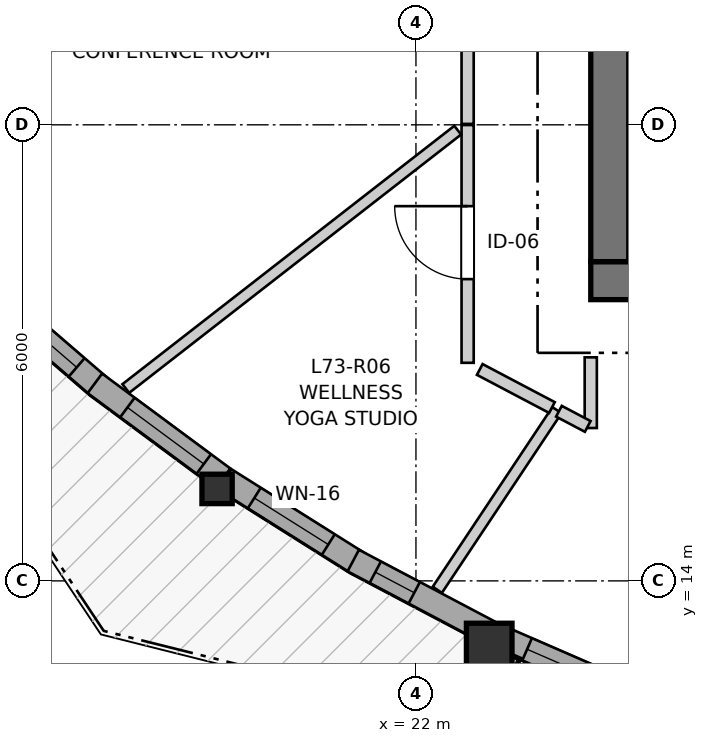
"""IFC4 building model, lengths in metres.
Left out: names, types, materials, properties, quantities, classifications, styles, units other than length and angle.
Written with IfcOpenShell. Run it as: python <this file> out.ifc"""

import sys

from ifc_helpers import new_model, si_unit, direction, frame, frame_2d, origin, origin_2d, place, context, subcontext, project, spatial, rectangle, i_section, extrude, source, transform, mapped, element, fill, save


model = new_model("IFC4")
c1 = context("Model", 3, precision=1e-05, world=origin(), true_north=direction((0.0, 1.0)))
c2 = subcontext(c1, "Body", "Model", "MODEL_VIEW")
j1 = project(units=[si_unit("LENGTHUNIT", "METRE"), si_unit("PLANEANGLEUNIT", "RADIAN")], contexts=[c1])
p1 = place(None, origin())
s1 = spatial("IfcSite", under=j1, at=p1, CompositionType="ELEMENT")
p2 = place(p1, origin())
s2 = spatial("IfcBuilding", under=s1, at=p2, CompositionType="ELEMENT")
p3 = place(p2, frame((0.0, 0.0, 243.6)))
s3 = spatial("IfcBuildingStorey", under=s2, at=p3, CompositionType="ELEMENT", Elevation=243.6)
p4 = place(p3, frame((24.3, 17.95, 0.0), z_axis=(0.0, 0.0, 1.0), x_axis=(1.0, 0.0, 0.0)))
e1 = element("IfcWall", 1, at=p4, inside=s3, PredefinedType="SHEAR", context=c2, shape_type="SweptSolid", body=[
    extrude(rectangle(XDim=12.1, YDim=0.5, at=frame_2d((6.05, 0.0))), origin(), (0.0, 0.0, 1.0), 2.96),
])
p5 = place(p3, frame((24.55, 33.8, 0.0), z_axis=(0.0, 0.0, 1.0), x_axis=(0.0, -1.0, 0.0)))
e2 = element("IfcWall", 2, at=p5, inside=s3, PredefinedType="SHEAR", context=c2, shape_type="SweptSolid", body=[
    extrude(rectangle(XDim=15.6, YDim=0.5, at=frame_2d((7.8, 0.0))), origin(), (0.0, 0.0, 1.0), 2.96),
])
p6 = place(p5, frame((7.05, 0.0, 0.0)))
e3 = element("IfcOpeningElement", 3, at=p6, cuts=e2, PredefinedType="OPENING", context=c2, shape_type="SweptSolid", body=[
    extrude(rectangle(XDim=1.5, YDim=2.15, at=frame_2d((0.75, 1.075))), frame((0.0, 0.26, 0.0), z_axis=(0.0, -1.0, 0.0), x_axis=(1.0, 0.0, 0.0)), (0.0, 0.0, 1.0), 0.52),
])
p7 = place(p5, frame((3.52, 0.0, 0.0)))
e4 = element("IfcOpeningElement", 4, at=p7, cuts=e2, PredefinedType="OPENING", context=c2, shape_type="SweptSolid", body=[
    extrude(rectangle(XDim=0.86, YDim=2.05, at=frame_2d((0.43, 1.025))), frame((0.0, 0.26, 0.0), z_axis=(0.0, -1.0, 0.0), x_axis=(1.0, 0.0, 0.0)), (0.0, 0.0, 1.0), 0.52),
])
p8 = place(p5, frame((11.22, 0.0, 0.0)))
e5 = element("IfcOpeningElement", 5, at=p8, cuts=e2, PredefinedType="OPENING", context=c2, shape_type="SweptSolid", body=[
    extrude(rectangle(XDim=0.86, YDim=2.05, at=frame_2d((0.43, 1.025))), frame((0.0, 0.26, 0.0), z_axis=(0.0, -1.0, 0.0), x_axis=(1.0, 0.0, 0.0)), (0.0, 0.0, 1.0), 0.52),
])
m1 = source(origin(), c2, "Body", "SweptSolid", [
    extrude(i_section(OverallWidth=0.398, OverallDepth=0.387, WebThickness=0.019, FlangeThickness=0.03, FilletRadius=0.015, at=origin_2d()), origin(), (0.0, 0.0, 1.0), 2.96),
])
p9 = place(p3, frame((19.383, 15.21, 0.0), z_axis=(0.0, 0.0, 1.0), x_axis=(1.0, 0.0, 0.0)))
e6 = element("IfcColumn", 6, at=p9, inside=s3, PredefinedType="PILASTER", context=c2, shape_type="MappedRepresentation", body=[
    mapped(m1, transform((0.0, 0.0, 0.0), x_axis=(1.0, 0.0, 0.0), y_axis=(0.0, 1.0, 0.0), z_axis=(0.0, 0.0, 1.0), scale=1.0)),
])
m2 = source(origin(), c2, "Body", "SweptSolid", [
    extrude(rectangle(XDim=0.6, YDim=0.6, at=origin_2d()), origin(), (0.0, 0.0, 1.0), 2.96),
])
p10 = place(p3, frame((22.964, 13.143, 0.0), z_axis=(0.0, 0.0, 1.0), x_axis=(1.0, 0.0, 0.0)))
e7 = element("IfcColumn", 7, at=p10, inside=s3, PredefinedType="COLUMN", context=c2, shape_type="MappedRepresentation", body=[
    mapped(m2, transform((0.0, 0.0, 0.0), x_axis=(1.0, 0.0, 0.0), y_axis=(0.0, 1.0, 0.0), z_axis=(0.0, 0.0, 1.0), scale=1.0)),
])
p11 = place(p3, frame((16.29, 17.884, 0.0), z_axis=(0.0, 0.0, 1.0), x_axis=(0.757405903716, -0.652944329186, 0.0)))
e8 = element("IfcWall", 8, at=p11, inside=s3, PredefinedType="SOLIDWALL", context=c2, shape_type="SweptSolid", body=[
    extrude(rectangle(XDim=2.052, YDim=0.32, at=frame_2d((1.026, 0.0))), origin(), (0.0, 0.0, 1.0), 2.58),
])
p12 = place(p11, frame((0.396, 0.0, 0.82)))
e9 = element("IfcOpeningElement", 9, at=p12, cuts=e8, PredefinedType="OPENING", context=c2, shape_type="SweptSolid", body=[
    extrude(rectangle(XDim=1.25, YDim=1.35, at=frame_2d((0.625, 0.675))), frame((0.0, 0.17, 0.0), z_axis=(0.0, -1.0, 0.0), x_axis=(1.0, 0.0, 0.0)), (0.0, 0.0, 1.0), 0.34),
])
p13 = place(p3, frame((17.775, 16.599, 0.0), z_axis=(0.0, 0.0, 1.0), x_axis=(0.803808524664, -0.594888103493, 0.0)))
e10 = element("IfcWall", 10, at=p13, inside=s3, PredefinedType="SOLIDWALL", context=c2, shape_type="SweptSolid", body=[
    extrude(rectangle(XDim=2.099, YDim=0.32, at=frame_2d((1.049, 0.0))), origin(), (0.0, 0.0, 1.0), 2.58),
])
p14 = place(p13, frame((0.533, 0.0, 0.82)))
e11 = element("IfcOpeningElement", 11, at=p14, cuts=e10, PredefinedType="OPENING", context=c2, shape_type="SweptSolid", body=[
    extrude(rectangle(XDim=1.25, YDim=1.35, at=frame_2d((0.625, 0.675))), frame((0.0, 0.17, 0.0), z_axis=(0.0, -1.0, 0.0), x_axis=(1.0, 0.0, 0.0)), (0.0, 0.0, 1.0), 0.34),
])
p15 = place(p3, frame((19.486, 15.335, 0.0), z_axis=(0.0, 0.0, 1.0), x_axis=(0.846377392327, -0.532583617621, 0.0)))
e12 = element("IfcWall", 12, at=p15, inside=s3, PredefinedType="SOLIDWALL", context=c2, shape_type="SweptSolid", body=[
    extrude(rectangle(XDim=2.087, YDim=0.32, at=frame_2d((1.043, 0.0))), origin(), (0.0, 0.0, 1.0), 2.58),
])
p16 = place(p15, frame((0.458, 0.0, 0.82)))
e13 = element("IfcOpeningElement", 13, at=p16, cuts=e12, PredefinedType="OPENING", context=c2, shape_type="SweptSolid", body=[
    extrude(rectangle(XDim=1.15, YDim=1.2, at=frame_2d((0.575, 0.6))), frame((0.0, 0.17, 0.0), z_axis=(0.0, -1.0, 0.0), x_axis=(1.0, 0.0, 0.0)), (0.0, 0.0, 1.0), 0.34),
])
p17 = place(p3, frame((21.175, 14.268, 0.0), z_axis=(0.0, 0.0, 1.0), x_axis=(0.88438197682, -0.466763879362, 0.0)))
e14 = element("IfcWall", 14, at=p17, inside=s3, PredefinedType="SOLIDWALL", context=c2, shape_type="SweptSolid", body=[
    extrude(rectangle(XDim=2.017, YDim=0.32, at=frame_2d((1.008, 0.0))), origin(), (0.0, 0.0, 1.0), 2.58),
])
p18 = place(p17, frame((0.327, 0.0, 0.82)))
e15 = element("IfcOpeningElement", 15, at=p18, cuts=e14, PredefinedType="OPENING", context=c2, shape_type="SweptSolid", body=[
    extrude(rectangle(XDim=0.58, YDim=1.35, at=frame_2d((0.29, 0.675))), frame((0.0, 0.17, 0.0), z_axis=(0.0, -1.0, 0.0), x_axis=(1.0, 0.0, 0.0)), (0.0, 0.0, 1.0), 0.34),
])
p19 = place(p3, frame((23.11, 13.254, 0.0), z_axis=(0.0, 0.0, 1.0), x_axis=(0.917071969608, -0.398721710671, 0.0)))
e16 = element("IfcWall", 16, at=p19, inside=s3, PredefinedType="SOLIDWALL", context=c2, shape_type="SweptSolid", body=[
    extrude(rectangle(XDim=2.029, YDim=0.32, at=frame_2d((1.014, 0.0))), origin(), (0.0, 0.0, 1.0), 2.58),
])
p20 = place(p19, frame((0.384, 0.0, 0.82)))
e17 = element("IfcOpeningElement", 17, at=p20, cuts=e16, PredefinedType="OPENING", context=c2, shape_type="SweptSolid", body=[
    extrude(rectangle(XDim=1.25, YDim=1.35, at=frame_2d((0.625, 0.675))), frame((0.0, 0.17, 0.0), z_axis=(0.0, -1.0, 0.0), x_axis=(1.0, 0.0, 0.0)), (0.0, 0.0, 1.0), 0.34),
])
p21 = place(p3, frame((22.68, 20.012, 0.0), z_axis=(0.0, 0.0, 1.0), x_axis=(0.0, 1.0, 0.0)))
e18 = element("IfcWall", 18, at=p21, inside=s3, PredefinedType="PARTITIONING", context=c2, shape_type="SweptSolid", body=[
    extrude(rectangle(XDim=4.138, YDim=0.16, at=frame_2d((2.069, 0.0))), origin(), (0.0, 0.0, 1.0), 2.96),
])
p22 = place(p21, frame((1.466, 0.0, 0.0)))
e19 = element("IfcOpeningElement", 19, at=p22, cuts=e18, PredefinedType="OPENING", context=c2, shape_type="SweptSolid", body=[
    extrude(rectangle(XDim=1.3, YDim=2.1, at=frame_2d((0.65, 1.05))), frame((0.0, 0.09, 0.0), z_axis=(0.0, -1.0, 0.0), x_axis=(1.0, 0.0, 0.0)), (0.0, 0.0, 1.0), 0.18),
])
p23 = place(p3, frame((22.68, 16.869, 0.0), z_axis=(0.0, 0.0, 1.0), x_axis=(0.0, 1.0, 0.0)))
e20 = element("IfcWall", 20, at=p23, inside=s3, PredefinedType="PARTITIONING", context=c2, shape_type="SweptSolid", body=[
    extrude(rectangle(XDim=3.128, YDim=0.16, at=frame_2d((1.564, 0.0))), origin(), (0.0, 0.0, 1.0), 2.96),
])
p24 = place(p23, frame((1.101, 0.0, 0.0)))
e21 = element("IfcOpeningElement", 21, at=p24, cuts=e20, PredefinedType="OPENING", context=c2, shape_type="SweptSolid", body=[
    extrude(rectangle(XDim=0.96, YDim=2.1, at=frame_2d((0.48, 1.05))), frame((0.0, 0.09, 0.0), z_axis=(0.0, -1.0, 0.0), x_axis=(1.0, 0.0, 0.0)), (0.0, 0.0, 1.0), 0.18),
])
p25 = place(p3, frame((18.182, 16.531, 0.0), z_axis=(0.0, 0.0, 1.0), x_axis=(0.789162127136, 0.614184937209, 0.0)))
e22 = element("IfcWall", 22, at=p25, inside=s3, PredefinedType="PARTITIONING", context=c2, shape_type="SweptSolid", body=[
    extrude(rectangle(XDim=5.534, YDim=0.145, at=frame_2d((2.767, 0.0))), origin(), (0.0, 0.0, 1.0), 2.96),
])
p26 = place(p3, frame((22.281, 13.882, 0.0), z_axis=(0.0, 0.0, 1.0), x_axis=(0.554204156683, 0.832380773874, 0.0)))
e23 = element("IfcWall", 23, at=p26, inside=s3, PredefinedType="PARTITIONING", context=c2, shape_type="SweptSolid", body=[
    extrude(rectangle(XDim=2.84, YDim=0.145, at=frame_2d((1.42, 0.0))), origin(), (0.0, 0.0, 1.0), 2.96),
])
p27 = place(p3, frame((22.839, 16.781, 0.0), z_axis=(0.0, 0.0, 1.0), x_axis=(0.884533287542, -0.466477076853, 0.0)))
e24 = element("IfcWall", 24, at=p27, inside=s3, PredefinedType="PARTITIONING", context=c2, shape_type="SweptSolid", body=[
    extrude(rectangle(XDim=1.074, YDim=0.16, at=frame_2d((0.537, 0.0))), origin(), (0.0, 0.0, 1.0), 2.96),
])
p28 = place(p3, frame((24.3, 16.011, 0.0), z_axis=(0.0, 0.0, 1.0), x_axis=(0.0, 1.0, 0.0)))
e25 = element("IfcWall", 25, at=p28, inside=s3, PredefinedType="PARTITIONING", context=c2, shape_type="SweptSolid", body=[
    extrude(rectangle(XDim=0.93, YDim=0.16, at=frame_2d((0.465, 0.0))), origin(), (0.0, 0.0, 1.0), 2.96),
])
p29 = place(p3, frame((23.881, 16.232, 0.0), z_axis=(0.0, 0.0, 1.0), x_axis=(0.884769878191, -0.466028177953, 0.0)))
e26 = element("IfcWall", 26, at=p29, inside=s3, PredefinedType="PARTITIONING", context=c2, shape_type="SweptSolid", body=[
    extrude(rectangle(XDim=0.428, YDim=0.16, at=frame_2d((0.214, 0.0))), origin(), (0.0, 0.0, 1.0), 2.96),
])
m3 = source(origin(), c2, "Body", "SweptSolid", [
    extrude(rectangle(XDim=1.25, YDim=1.35, at=frame_2d((0.625, 0.675))), frame((0.0, 0.03, 0.0), z_axis=(0.0, -1.0, 0.0), x_axis=(1.0, 0.0, 0.0)), (0.0, 0.0, 1.0), 0.06),
])
p30 = place(p12, origin())
e27 = element("IfcWindow", 27, at=p30, inside=s3, PartitioningType="SINGLE_PANEL", PredefinedType="WINDOW", context=c2, shape_type="MappedRepresentation", body=[
    mapped(m3, transform((0.0, 0.0, 0.0), x_axis=(1.0, 0.0, 0.0), y_axis=(0.0, 1.0, 0.0), z_axis=(0.0, 0.0, 1.0), scale=1.0)),
])
fill(e9, e27)
p31 = place(p14, origin())
e28 = element("IfcWindow", 28, at=p31, inside=s3, PartitioningType="SINGLE_PANEL", PredefinedType="WINDOW", context=c2, shape_type="MappedRepresentation", body=[
    mapped(m3, transform((0.0, 0.0, 0.0), x_axis=(1.0, 0.0, 0.0), y_axis=(0.0, 1.0, 0.0), z_axis=(0.0, 0.0, 1.0), scale=1.0)),
])
fill(e11, e28)
m4 = source(origin(), c2, "Body", "SweptSolid", [
    extrude(rectangle(XDim=1.15, YDim=1.2, at=frame_2d((0.575, 0.6))), frame((0.0, 0.03, 0.0), z_axis=(0.0, -1.0, 0.0), x_axis=(1.0, 0.0, 0.0)), (0.0, 0.0, 1.0), 0.06),
])
p32 = place(p16, origin())
e29 = element("IfcWindow", 29, at=p32, inside=s3, PartitioningType="SINGLE_PANEL", PredefinedType="WINDOW", context=c2, shape_type="MappedRepresentation", body=[
    mapped(m4, transform((0.0, 0.0, 0.0), x_axis=(1.0, 0.0, 0.0), y_axis=(0.0, 1.0, 0.0), z_axis=(0.0, 0.0, 1.0), scale=1.0)),
])
fill(e13, e29)
m5 = source(origin(), c2, "Body", "SweptSolid", [
    extrude(rectangle(XDim=0.58, YDim=1.35, at=frame_2d((0.29, 0.675))), frame((0.0, 0.03, 0.0), z_axis=(0.0, -1.0, 0.0), x_axis=(1.0, 0.0, 0.0)), (0.0, 0.0, 1.0), 0.06),
])
p33 = place(p18, origin())
e30 = element("IfcWindow", 30, at=p33, inside=s3, PartitioningType="SINGLE_PANEL", PredefinedType="WINDOW", context=c2, shape_type="MappedRepresentation", body=[
    mapped(m5, transform((0.0, 0.0, 0.0), x_axis=(1.0, 0.0, 0.0), y_axis=(0.0, 1.0, 0.0), z_axis=(0.0, 0.0, 1.0), scale=1.0)),
])
fill(e15, e30)
p34 = place(p20, origin())
e31 = element("IfcWindow", 31, at=p34, inside=s3, PartitioningType="SINGLE_PANEL", PredefinedType="WINDOW", context=c2, shape_type="MappedRepresentation", body=[
    mapped(m3, transform((0.0, 0.0, 0.0), x_axis=(1.0, 0.0, 0.0), y_axis=(0.0, 1.0, 0.0), z_axis=(0.0, 0.0, 1.0), scale=1.0)),
])
fill(e17, e31)
m6 = source(origin(), c2, "Body", "SweptSolid", [
    extrude(rectangle(XDim=0.96, YDim=2.1, at=frame_2d((0.48, 1.05))), frame((0.0, 0.025, 0.0), z_axis=(0.0, -1.0, 0.0), x_axis=(1.0, 0.0, 0.0)), (0.0, 0.0, 1.0), 0.05),
])
p35 = place(p24, origin())
e32 = element("IfcDoor", 32, at=p35, inside=s3, OperationType="SINGLE_SWING_RIGHT", PredefinedType="DOOR", context=c2, shape_type="MappedRepresentation", body=[
    mapped(m6, transform((0.0, 0.0, 0.0), x_axis=(1.0, 0.0, 0.0), y_axis=(0.0, 1.0, 0.0), z_axis=(0.0, 0.0, 1.0), scale=1.0)),
])
fill(e21, e32)
save(model, sys.argv[1])
